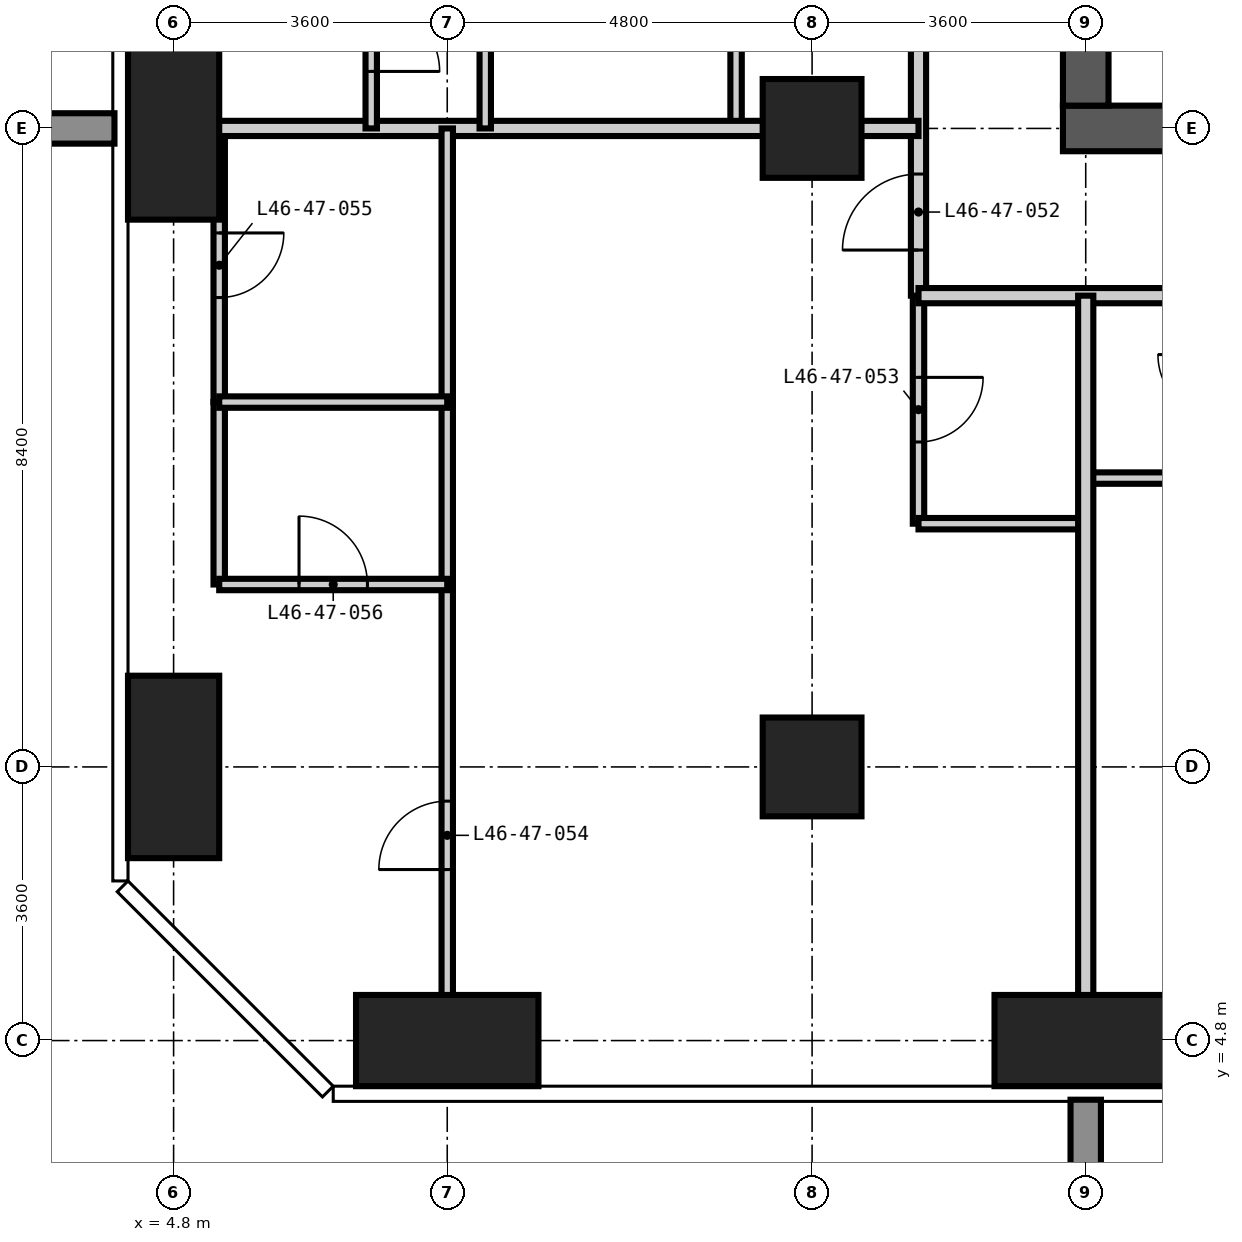
"""IFC4 building model, lengths in metres.
Left out: names, types, materials, properties, quantities, classifications, styles, units other than length and angle.
Written with IfcOpenShell. Run it as: python <this file> out.ifc"""

import sys

from ifc_helpers import new_model, si_unit, direction, frame, frame_2d, origin, origin_2d, place, context, subcontext, project, spatial, rectangle, extrude, element, fill, save


model = new_model("IFC4")
c1 = context("Model", 3, precision=1e-05, world=origin(), true_north=direction((0.0, 1.0)))
c2 = subcontext(c1, "Body", "Model", "MODEL_VIEW")
j1 = project(units=[si_unit("LENGTHUNIT", "METRE"), si_unit("PLANEANGLEUNIT", "RADIAN")], contexts=[c1])
p1 = place(None, origin())
s1 = spatial("IfcSite", under=j1, at=p1, CompositionType="ELEMENT")
p2 = place(p1, origin())
s2 = spatial("IfcBuilding", under=s1, at=p2, CompositionType="ELEMENT")
p3 = place(p2, frame((0.0, 0.0, 180.6)))
s3 = spatial("IfcBuildingStorey", under=s2, at=p3, CompositionType="ELEMENT", Elevation=180.6)
for number, where, z_axis, x_axis in (
    (1, (4.8, 8.4, -0.35), (0.0, 0.0, 1.0), (1.0, 0.0, 0.0)),
    (2, (4.8, 16.8, -0.35), (0.0, 0.0, 1.0), (1.0, 0.0, 0.0)),
):
    element("IfcColumn", number, at=place(p3, frame(where, z_axis=z_axis, x_axis=x_axis)), inside=s3, PredefinedType="COLUMN", context=c2, shape_type="SweptSolid", body=[
        extrude(rectangle(XDim=1.2, YDim=2.4, at=origin_2d()), origin(), (0.0, 0.0, 1.0), 3.6),
    ])
p4 = place(p3, frame((8.4, 4.8, -0.35), z_axis=(0.0, 0.0, 1.0), x_axis=(1.0, 0.0, 0.0)))
e3 = element("IfcColumn", 3, at=p4, inside=s3, PredefinedType="COLUMN", context=c2, shape_type="SweptSolid", body=[
    extrude(rectangle(XDim=2.4, YDim=1.2, at=origin_2d()), origin(), (0.0, 0.0, 1.0), 3.6),
])
for number, where, z_axis, x_axis in (
    (4, (13.2, 8.4, -0.35), (0.0, 0.0, 1.0), (1.0, 0.0, 0.0)),
    (5, (13.2, 16.8, -0.35), (0.0, 0.0, 1.0), (1.0, 0.0, 0.0)),
):
    element("IfcColumn", number, at=place(p3, frame(where, z_axis=z_axis, x_axis=x_axis)), inside=s3, PredefinedType="COLUMN", context=c2, shape_type="SweptSolid", body=[
        extrude(rectangle(XDim=1.3, YDim=1.3, at=origin_2d()), origin(), (0.0, 0.0, 1.0), 3.6),
    ])
p5 = place(p3, frame((16.8, 4.8, -0.35), z_axis=(0.0, 0.0, 1.0), x_axis=(1.0, 0.0, 0.0)))
e6 = element("IfcColumn", 6, at=p5, inside=s3, PredefinedType="COLUMN", context=c2, shape_type="SweptSolid", body=[
    extrude(rectangle(XDim=2.4, YDim=1.2, at=origin_2d()), origin(), (0.0, 0.0, 1.0), 3.6),
])
p6 = place(p3, frame((16.5, 16.8, -0.35), z_axis=(0.0, 0.0, 1.0), x_axis=(1.0, 0.0, 0.0)))
e7 = element("IfcWall", 7, at=p6, inside=s3, PredefinedType="SHEAR", context=c2, shape_type="SweptSolid", body=[
    extrude(rectangle(XDim=25.8, YDim=0.6, at=frame_2d((12.9, 0.0))), origin(), (0.0, 0.0, 1.0), 3.6),
])
p7 = place(p6, frame((12.4, 0.0, 0.35)))
e8 = element("IfcOpeningElement", 8, at=p7, cuts=e7, PredefinedType="OPENING", context=c2, shape_type="SweptSolid", body=[
    extrude(rectangle(XDim=1.0, YDim=2.1, at=frame_2d((0.5, 1.05))), frame((0.0, 0.31, 0.0), z_axis=(0.0, -1.0, 0.0), x_axis=(1.0, 0.0, 0.0)), (0.0, 0.0, 1.0), 0.62),
])
p8 = place(p6, frame((18.7, 0.0, 0.35)))
e9 = element("IfcOpeningElement", 9, at=p8, cuts=e7, PredefinedType="OPENING", context=c2, shape_type="SweptSolid", body=[
    extrude(rectangle(XDim=1.0, YDim=2.1, at=frame_2d((0.5, 1.05))), frame((0.0, 0.31, 0.0), z_axis=(0.0, -1.0, 0.0), x_axis=(1.0, 0.0, 0.0)), (0.0, 0.0, 1.0), 0.62),
])
p9 = place(p3, frame((16.8, 41.7, -0.35), z_axis=(0.0, 0.0, 1.0), x_axis=(0.0, -1.0, 0.0)))
e10 = element("IfcWall", 10, at=p9, inside=s3, PredefinedType="SHEAR", context=c2, shape_type="SweptSolid", body=[
    extrude(rectangle(XDim=24.6, YDim=0.6, at=frame_2d((12.3, 0.0))), origin(), (0.0, 0.0, 1.0), 3.6),
])
p10 = place(p9, frame((11.4, 0.0, 0.35)))
e11 = element("IfcOpeningElement", 11, at=p10, cuts=e10, PredefinedType="OPENING", context=c2, shape_type="SweptSolid", body=[
    extrude(rectangle(XDim=1.8, YDim=2.2, at=frame_2d((0.9, 1.1))), frame((0.0, 0.31, 0.0), z_axis=(0.0, -1.0, 0.0), x_axis=(1.0, 0.0, 0.0)), (0.0, 0.0, 1.0), 0.62),
])
p11 = place(p9, frame((20.2, 0.0, 0.35)))
e12 = element("IfcOpeningElement", 12, at=p11, cuts=e10, PredefinedType="OPENING", context=c2, shape_type="SweptSolid", body=[
    extrude(rectangle(XDim=1.0, YDim=2.1, at=frame_2d((0.5, 1.05))), frame((0.0, 0.31, 0.0), z_axis=(0.0, -1.0, 0.0), x_axis=(1.0, 0.0, 0.0)), (0.0, 0.0, 1.0), 0.62),
])
p12 = place(p9, frame((5.5, 0.0, 0.35)))
e13 = element("IfcOpeningElement", 13, at=p12, cuts=e10, PredefinedType="OPENING", context=c2, shape_type="SweptSolid", body=[
    extrude(rectangle(XDim=1.0, YDim=2.1, at=frame_2d((0.5, 1.05))), frame((0.0, 0.31, 0.0), z_axis=(0.0, -1.0, 0.0), x_axis=(1.0, 0.0, 0.0)), (0.0, 0.0, 1.0), 0.62),
])
p13 = place(p3, frame((5.4, 13.2, 0.0), z_axis=(0.0, 0.0, 1.0), x_axis=(0.0, 1.0, 0.0)))
e14 = element("IfcWall", 14, at=p13, inside=s3, PredefinedType="PARTITIONING", context=c2, shape_type="SweptSolid", body=[
    extrude(rectangle(XDim=3.6, YDim=0.15, at=frame_2d((1.8, 0.0))), origin(), (0.0, 0.0, 1.0), 3.25),
])
p14 = place(p13, frame((1.375, 0.0, 0.0)))
e15 = element("IfcOpeningElement", 15, at=p14, cuts=e14, PredefinedType="OPENING", context=c2, shape_type="SweptSolid", body=[
    extrude(rectangle(XDim=0.85, YDim=2.1, at=frame_2d((0.425, 1.05))), frame((0.0, 0.085, 0.0), z_axis=(0.0, -1.0, 0.0), x_axis=(1.0, 0.0, 0.0)), (0.0, 0.0, 1.0), 0.17),
])
p15 = place(p3, frame((12.2, 16.8, 0.0), z_axis=(0.0, 0.0, 1.0), x_axis=(0.0, 1.0, 0.0)))
e16 = element("IfcWall", 16, at=p15, inside=s3, PredefinedType="PARTITIONING", context=c2, shape_type="SweptSolid", body=[
    extrude(rectangle(XDim=2.4, YDim=0.15, at=frame_2d((1.2, 0.0))), origin(), (0.0, 0.0, 1.0), 3.25),
])
p16 = place(p3, frame((14.6, 11.6, 0.0), z_axis=(0.0, 0.0, 1.0), x_axis=(0.0, 1.0, 0.0)))
e17 = element("IfcWall", 17, at=p16, inside=s3, PredefinedType="PARTITIONING", context=c2, shape_type="SweptSolid", body=[
    extrude(rectangle(XDim=3.0, YDim=0.15, at=frame_2d((1.5, 0.0))), origin(), (0.0, 0.0, 1.0), 3.25),
])
p17 = place(p16, frame((1.075, 0.0, 0.0)))
e18 = element("IfcOpeningElement", 18, at=p17, cuts=e17, PredefinedType="OPENING", context=c2, shape_type="SweptSolid", body=[
    extrude(rectangle(XDim=0.85, YDim=2.1, at=frame_2d((0.425, 1.05))), frame((0.0, 0.085, 0.0), z_axis=(0.0, -1.0, 0.0), x_axis=(1.0, 0.0, 0.0)), (0.0, 0.0, 1.0), 0.17),
])
p18 = place(p3, frame((14.6, 11.6, 0.0), z_axis=(0.0, 0.0, 1.0), x_axis=(1.0, 0.0, 0.0)))
e19 = element("IfcWall", 19, at=p18, inside=s3, PredefinedType="PARTITIONING", context=c2, shape_type="SweptSolid", body=[
    extrude(rectangle(XDim=2.2, YDim=0.15, at=frame_2d((1.1, 0.0))), origin(), (0.0, 0.0, 1.0), 3.25),
])
p19 = place(p3, frame((16.8, 12.2, 0.0), z_axis=(0.0, 0.0, 1.0), x_axis=(1.0, 0.0, 0.0)))
e20 = element("IfcWall", 20, at=p19, inside=s3, PredefinedType="PARTITIONING", context=c2, shape_type="SweptSolid", body=[
    extrude(rectangle(XDim=1.8, YDim=0.15, at=frame_2d((0.9, 0.0))), origin(), (0.0, 0.0, 1.0), 3.25),
])
p20 = place(p3, frame((14.6, 14.6, 0.0), z_axis=(0.0, 0.0, 1.0), x_axis=(0.0, 1.0, 0.0)))
e21 = element("IfcWall", 21, at=p20, inside=s3, PredefinedType="PARTITIONING", context=c2, shape_type="SweptSolid", body=[
    extrude(rectangle(XDim=30.8, YDim=0.2, at=frame_2d((15.4, 0.0))), origin(), (0.0, 0.0, 1.0), 3.25),
])
p21 = place(p20, frame((5.9, 0.0, 0.0)))
e22 = element("IfcOpeningElement", 22, at=p21, cuts=e21, PredefinedType="OPENING", context=c2, shape_type="SweptSolid", body=[
    extrude(rectangle(XDim=1.0, YDim=2.2, at=frame_2d((0.5, 1.1))), frame((0.0, 0.11, 0.0), z_axis=(0.0, -1.0, 0.0), x_axis=(1.0, 0.0, 0.0)), (0.0, 0.0, 1.0), 0.22),
])
p22 = place(p20, frame((11.8, 0.0, 0.0)))
e23 = element("IfcOpeningElement", 23, at=p22, cuts=e21, PredefinedType="OPENING", context=c2, shape_type="SweptSolid", body=[
    extrude(rectangle(XDim=1.8, YDim=2.4, at=frame_2d((0.9, 1.2))), frame((0.0, 0.11, 0.0), z_axis=(0.0, -1.0, 0.0), x_axis=(1.0, 0.0, 0.0)), (0.0, 0.0, 1.0), 0.22),
])
p23 = place(p20, frame((19.425, 0.0, 0.0)))
e24 = element("IfcOpeningElement", 24, at=p23, cuts=e21, PredefinedType="OPENING", context=c2, shape_type="SweptSolid", body=[
    extrude(rectangle(XDim=1.0, YDim=2.2, at=frame_2d((0.5, 1.1))), frame((0.0, 0.11, 0.0), z_axis=(0.0, -1.0, 0.0), x_axis=(1.0, 0.0, 0.0)), (0.0, 0.0, 1.0), 0.22),
])
p24 = place(p20, frame((24.8, 0.0, 0.0)))
e25 = element("IfcOpeningElement", 25, at=p24, cuts=e21, PredefinedType="OPENING", context=c2, shape_type="SweptSolid", body=[
    extrude(rectangle(XDim=1.0, YDim=2.2, at=frame_2d((0.5, 1.1))), frame((0.0, 0.11, 0.0), z_axis=(0.0, -1.0, 0.0), x_axis=(1.0, 0.0, 0.0)), (0.0, 0.0, 1.0), 0.22),
])
p25 = place(p20, frame((0.6, 0.0, 0.0)))
e26 = element("IfcOpeningElement", 26, at=p25, cuts=e21, PredefinedType="OPENING", context=c2, shape_type="SweptSolid", body=[
    extrude(rectangle(XDim=1.0, YDim=2.2, at=frame_2d((0.5, 1.1))), frame((0.0, 0.11, 0.0), z_axis=(0.0, -1.0, 0.0), x_axis=(1.0, 0.0, 0.0)), (0.0, 0.0, 1.0), 0.22),
])
p26 = place(p20, frame((28.6, 0.0, 0.0)))
e27 = element("IfcOpeningElement", 27, at=p26, cuts=e21, PredefinedType="OPENING", context=c2, shape_type="SweptSolid", body=[
    extrude(rectangle(XDim=1.0, YDim=2.2, at=frame_2d((0.5, 1.1))), frame((0.0, 0.11, 0.0), z_axis=(0.0, -1.0, 0.0), x_axis=(1.0, 0.0, 0.0)), (0.0, 0.0, 1.0), 0.22),
])
p27 = place(p3, frame((44.8, 14.6, 0.0), z_axis=(0.0, 0.0, 1.0), x_axis=(-1.0, 0.0, 0.0)))
e28 = element("IfcWall", 28, at=p27, inside=s3, PredefinedType="PARTITIONING", context=c2, shape_type="SweptSolid", body=[
    extrude(rectangle(XDim=30.2, YDim=0.2, at=frame_2d((15.1, 0.0))), origin(), (0.0, 0.0, 1.0), 3.25),
])
p28 = place(p27, frame((24.5, 0.0, 0.0)))
e29 = element("IfcOpeningElement", 29, at=p28, cuts=e28, PredefinedType="OPENING", context=c2, shape_type="SweptSolid", body=[
    extrude(rectangle(XDim=1.0, YDim=2.2, at=frame_2d((0.5, 1.1))), frame((0.0, 0.11, 0.0), z_axis=(0.0, -1.0, 0.0), x_axis=(1.0, 0.0, 0.0)), (0.0, 0.0, 1.0), 0.22),
])
p29 = place(p27, frame((13.7, 0.0, 0.0)))
e30 = element("IfcOpeningElement", 30, at=p29, cuts=e28, PredefinedType="OPENING", context=c2, shape_type="SweptSolid", body=[
    extrude(rectangle(XDim=1.0, YDim=2.2, at=frame_2d((0.5, 1.1))), frame((0.0, 0.11, 0.0), z_axis=(0.0, -1.0, 0.0), x_axis=(1.0, 0.0, 0.0)), (0.0, 0.0, 1.0), 0.22),
])
p30 = place(p27, frame((7.7, 0.0, 0.0)))
e31 = element("IfcOpeningElement", 31, at=p30, cuts=e28, PredefinedType="OPENING", context=c2, shape_type="SweptSolid", body=[
    extrude(rectangle(XDim=1.0, YDim=2.2, at=frame_2d((0.5, 1.1))), frame((0.0, 0.11, 0.0), z_axis=(0.0, -1.0, 0.0), x_axis=(1.0, 0.0, 0.0)), (0.0, 0.0, 1.0), 0.22),
])
for number, where, z_axis, x_axis in (
    (32, (16.8, 4.182, 0.0), (0.0, 0.0, 1.0), (0.0, 1.0, 0.0)),
    (33, (4.182, 16.8, 0.0), (0.0, 0.0, 1.0), (1.0, 0.0, 0.0)),
):
    element("IfcWall", number, at=place(p3, frame(where, z_axis=z_axis, x_axis=x_axis)), inside=s3, PredefinedType="PARTITIONING", context=c2, shape_type="SweptSolid", body=[
        extrude(rectangle(XDim=10.418, YDim=0.2, at=frame_2d((5.209, 0.0))), origin(), (0.0, 0.0, 1.0), 3.25),
    ])
p31 = place(p3, frame((5.4, 10.8, 0.0), z_axis=(0.0, 0.0, 1.0), x_axis=(0.0, 1.0, 0.0)))
e34 = element("IfcWall", 34, at=p31, inside=s3, PredefinedType="PARTITIONING", context=c2, shape_type="SweptSolid", body=[
    extrude(rectangle(XDim=2.4, YDim=0.15, at=frame_2d((1.2, 0.0))), origin(), (0.0, 0.0, 1.0), 3.25),
])
p32 = place(p3, frame((7.4, 16.8, 0.0), z_axis=(0.0, 0.0, 1.0), x_axis=(0.0, 1.0, 0.0)))
e35 = element("IfcWall", 35, at=p32, inside=s3, PredefinedType="PARTITIONING", context=c2, shape_type="SweptSolid", body=[
    extrude(rectangle(XDim=2.4, YDim=0.15, at=frame_2d((1.2, 0.0))), origin(), (0.0, 0.0, 1.0), 3.25),
])
p33 = place(p32, frame((0.75, 0.0, 0.0)))
e36 = element("IfcOpeningElement", 36, at=p33, cuts=e35, PredefinedType="OPENING", context=c2, shape_type="SweptSolid", body=[
    extrude(rectangle(XDim=0.9, YDim=2.1, at=frame_2d((0.45, 1.05))), frame((0.0, 0.085, 0.0), z_axis=(0.0, -1.0, 0.0), x_axis=(1.0, 0.0, 0.0)), (0.0, 0.0, 1.0), 0.17),
])
p34 = place(p3, frame((8.4, 4.182, 0.0), z_axis=(0.0, 0.0, 1.0), x_axis=(0.0, 1.0, 0.0)))
e37 = element("IfcWall", 37, at=p34, inside=s3, PredefinedType="PARTITIONING", context=c2, shape_type="SweptSolid", body=[
    extrude(rectangle(XDim=12.618, YDim=0.15, at=frame_2d((6.309, 0.0))), origin(), (0.0, 0.0, 1.0), 3.25),
])
p35 = place(p34, frame((2.868, 0.0, 0.0)))
e38 = element("IfcOpeningElement", 38, at=p35, cuts=e37, PredefinedType="OPENING", context=c2, shape_type="SweptSolid", body=[
    extrude(rectangle(XDim=0.9, YDim=2.1, at=frame_2d((0.45, 1.05))), frame((0.0, 0.085, 0.0), z_axis=(0.0, -1.0, 0.0), x_axis=(1.0, 0.0, 0.0)), (0.0, 0.0, 1.0), 0.17),
])
p36 = place(p3, frame((8.9, 16.8, 0.0), z_axis=(0.0, 0.0, 1.0), x_axis=(0.0, 1.0, 0.0)))
e39 = element("IfcWall", 39, at=p36, inside=s3, PredefinedType="PARTITIONING", context=c2, shape_type="SweptSolid", body=[
    extrude(rectangle(XDim=2.4, YDim=0.15, at=frame_2d((1.2, 0.0))), origin(), (0.0, 0.0, 1.0), 3.25),
])
p37 = place(p3, frame((5.4, 10.8, 0.0), z_axis=(0.0, 0.0, 1.0), x_axis=(1.0, 0.0, 0.0)))
e40 = element("IfcWall", 40, at=p37, inside=s3, PredefinedType="PARTITIONING", context=c2, shape_type="SweptSolid", body=[
    extrude(rectangle(XDim=3.0, YDim=0.15, at=frame_2d((1.5, 0.0))), origin(), (0.0, 0.0, 1.0), 3.25),
])
p38 = place(p37, frame((1.05, 0.0, 0.0)))
e41 = element("IfcOpeningElement", 41, at=p38, cuts=e40, PredefinedType="OPENING", context=c2, shape_type="SweptSolid", body=[
    extrude(rectangle(XDim=0.9, YDim=2.1, at=frame_2d((0.45, 1.05))), frame((0.0, 0.085, 0.0), z_axis=(0.0, -1.0, 0.0), x_axis=(1.0, 0.0, 0.0)), (0.0, 0.0, 1.0), 0.17),
])
p39 = place(p3, frame((5.4, 13.2, 0.0), z_axis=(0.0, 0.0, 1.0), x_axis=(1.0, 0.0, 0.0)))
e42 = element("IfcWall", 42, at=p39, inside=s3, PredefinedType="PARTITIONING", context=c2, shape_type="SweptSolid", body=[
    extrude(rectangle(XDim=3.0, YDim=0.15, at=frame_2d((1.5, 0.0))), origin(), (0.0, 0.0, 1.0), 3.25),
])
p40 = place(p33, frame((0.9, 0.0, 0.0), z_axis=(0.0, 0.0, 1.0), x_axis=(-1.0, 0.0, 0.0)))
e43 = element("IfcDoor", 43, at=p40, inside=s3, OperationType="SINGLE_SWING_RIGHT", PredefinedType="DOOR", context=c2, shape_type="SweptSolid", body=[
    extrude(rectangle(XDim=0.9, YDim=2.1, at=frame_2d((0.45, 1.05))), frame((0.0, 0.025, 0.0), z_axis=(0.0, -1.0, 0.0), x_axis=(1.0, 0.0, 0.0)), (0.0, 0.0, 1.0), 0.05),
])
fill(e36, e43)
p41 = place(p25, origin())
e44 = element("IfcDoor", 44, at=p41, inside=s3, OperationType="SINGLE_SWING_LEFT", PredefinedType="DOOR", context=c2, shape_type="SweptSolid", body=[
    extrude(rectangle(XDim=1.0, YDim=2.2, at=frame_2d((0.5, 1.1))), frame((0.0, 0.025, 0.0), z_axis=(0.0, -1.0, 0.0), x_axis=(1.0, 0.0, 0.0)), (0.0, 0.0, 1.0), 0.05),
])
fill(e26, e44)
p42 = place(p17, frame((0.85, 0.0, 0.0), z_axis=(0.0, 0.0, 1.0), x_axis=(-1.0, 0.0, 0.0)))
e45 = element("IfcDoor", 45, at=p42, inside=s3, OperationType="SINGLE_SWING_LEFT", PredefinedType="DOOR", context=c2, shape_type="SweptSolid", body=[
    extrude(rectangle(XDim=0.85, YDim=2.1, at=frame_2d((0.425, 1.05))), frame((0.0, 0.025, 0.0), z_axis=(0.0, -1.0, 0.0), x_axis=(1.0, 0.0, 0.0)), (0.0, 0.0, 1.0), 0.05),
])
fill(e18, e45)
p43 = place(p35, origin())
e46 = element("IfcDoor", 46, at=p43, inside=s3, OperationType="SINGLE_SWING_LEFT", PredefinedType="DOOR", context=c2, shape_type="SweptSolid", body=[
    extrude(rectangle(XDim=0.9, YDim=2.1, at=frame_2d((0.45, 1.05))), frame((0.0, 0.025, 0.0), z_axis=(0.0, -1.0, 0.0), x_axis=(1.0, 0.0, 0.0)), (0.0, 0.0, 1.0), 0.05),
])
fill(e38, e46)
p44 = place(p14, frame((0.85, 0.0, 0.0), z_axis=(0.0, 0.0, 1.0), x_axis=(-1.0, 0.0, 0.0)))
e47 = element("IfcDoor", 47, at=p44, inside=s3, OperationType="SINGLE_SWING_LEFT", PredefinedType="DOOR", context=c2, shape_type="SweptSolid", body=[
    extrude(rectangle(XDim=0.85, YDim=2.1, at=frame_2d((0.425, 1.05))), frame((0.0, 0.025, 0.0), z_axis=(0.0, -1.0, 0.0), x_axis=(1.0, 0.0, 0.0)), (0.0, 0.0, 1.0), 0.05),
])
fill(e15, e47)
p45 = place(p38, origin())
e48 = element("IfcDoor", 48, at=p45, inside=s3, OperationType="SINGLE_SWING_LEFT", PredefinedType="DOOR", context=c2, shape_type="SweptSolid", body=[
    extrude(rectangle(XDim=0.9, YDim=2.1, at=frame_2d((0.45, 1.05))), frame((0.0, 0.025, 0.0), z_axis=(0.0, -1.0, 0.0), x_axis=(1.0, 0.0, 0.0)), (0.0, 0.0, 1.0), 0.05),
])
fill(e41, e48)
save(model, sys.argv[1])
